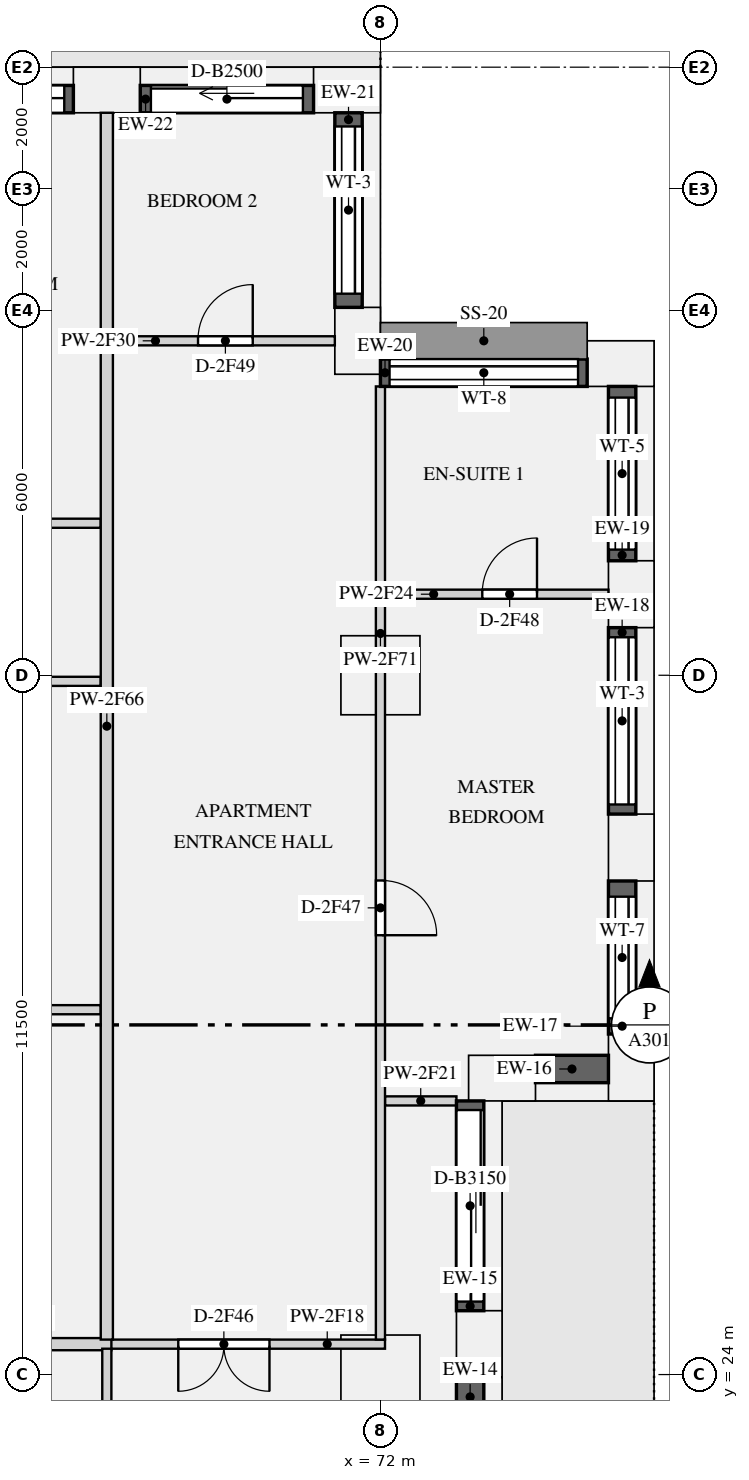
"""IFC4 building model, lengths in metres.
Left out: names, types, materials, properties, quantities, classifications, styles, units other than length and angle.
Written with IfcOpenShell. Run it as: python <this file> out.ifc"""

import sys

from ifc_helpers import new_model, si_unit, direction, frame, frame_2d, origin, origin_2d, place, context, subcontext, project, spatial, rectangle, extrude, element, fill, save


model = new_model("IFC4")
c1 = context("Model", 3, precision=1e-05, world=origin(), true_north=direction((0.0, 1.0)))
c2 = subcontext(c1, "Body", "Model", "MODEL_VIEW")
j1 = project(units=[si_unit("LENGTHUNIT", "METRE"), si_unit("PLANEANGLEUNIT", "RADIAN")], contexts=[c1])
p1 = place(None, origin())
s1 = spatial("IfcSite", under=j1, at=p1, CompositionType="ELEMENT")
p2 = place(p1, origin())
s2 = spatial("IfcBuilding", under=s1, at=p2, CompositionType="ELEMENT")
p3 = place(p2, frame((0.0, 0.0, 127.65)))
s3 = spatial("IfcBuildingStorey", under=s2, at=p3, CompositionType="ELEMENT", Elevation=127.65)
for number, where, z_axis, x_axis in (
    (1, (73.625, 24.5, 0.0), (0.0, 0.0, 1.0), (0.0, 1.0, 0.0)),
    (2, (74.0, 28.875, 0.0), (0.0, 0.0, 1.0), (1.0, 0.0, 0.0)),
    (3, (76.125, 29.05, 0.0), (0.0, 0.0, 1.0), (0.0, 1.0, 0.0)),
    (4, (76.125, 32.667, 0.0), (0.0, 0.0, 1.0), (0.0, 1.0, 0.0)),
    (5, (76.125, 36.833, 0.0), (0.0, 0.0, 1.0), (0.0, 1.0, 0.0)),
    (6, (75.95, 40.625, 0.0), (0.0, 0.0, 1.0), (-1.0, 0.0, 0.0)),
    (7, (71.625, 41.0, 0.0), (0.0, 0.0, 1.0), (0.0, 1.0, 0.0)),
    (8, (71.45, 45.125, 0.0), (0.0, 0.0, 1.0), (-1.0, 0.0, 0.0)),
    (9, (67.5, 45.125, 0.0), (0.0, 0.0, 1.0), (-1.0, 0.0, 0.0)),
):
    element("IfcColumn", number, at=place(p3, frame(where, z_axis=z_axis, x_axis=x_axis)), inside=s3, PredefinedType="USERDEFINED", context=c2, shape_type="SweptSolid", body=[
        extrude(rectangle(XDim=1.1, YDim=0.75, at=origin_2d()), origin(), (0.0, 0.0, 1.0), 3.15),
    ])
for number, where, z_axis, x_axis in (
    (10, (72.0, 24.0, 0.0), (0.0, 0.0, 1.0), (1.0, 0.0, 0.0)),
    (11, (72.0, 35.5, 0.0), (0.0, 0.0, 1.0), (1.0, 0.0, 0.0)),
):
    element("IfcColumn", number, at=place(p3, frame(where, z_axis=z_axis, x_axis=x_axis)), inside=s3, PredefinedType="COLUMN", context=c2, shape_type="SweptSolid", body=[
        extrude(rectangle(XDim=1.3, YDim=1.3, at=origin_2d()), origin(), (0.0, 0.0, 1.0), 3.15),
    ])
p4 = place(p3, frame((73.475, 21.05, 0.0), z_axis=(0.0, 0.0, 1.0), x_axis=(0.0, 1.0, 0.0)))
e12 = element("IfcWall", 12, at=p4, inside=s3, PredefinedType="SOLIDWALL", context=c2, shape_type="SweptSolid", body=[
    extrude(rectangle(XDim=2.9, YDim=0.45, at=frame_2d((1.45, 0.0))), origin(), (0.0, 0.0, 1.0), 2.65),
])
p5 = place(p4, frame((0.165, 0.0, 0.0)))
e13 = element("IfcOpeningElement", 13, at=p5, cuts=e12, PredefinedType="OPENING", context=c2, shape_type="SweptSolid", body=[
    extrude(rectangle(XDim=2.1, YDim=2.3, at=frame_2d((1.05, 1.15))), frame((0.0, 0.235, 0.0), z_axis=(0.0, -1.0, 0.0), x_axis=(1.0, 0.0, 0.0)), (0.0, 0.0, 1.0), 0.47),
])
p6 = place(p3, frame((73.475, 25.05, 0.0), z_axis=(0.0, 0.0, 1.0), x_axis=(0.0, 1.0, 0.0)))
e14 = element("IfcWall", 14, at=p6, inside=s3, PredefinedType="SOLIDWALL", context=c2, shape_type="SweptSolid", body=[
    extrude(rectangle(XDim=3.45, YDim=0.45, at=frame_2d((1.725, 0.0))), origin(), (0.0, 0.0, 1.0), 2.65),
])
p7 = place(p6, frame((0.15, 0.0, 0.0)))
e15 = element("IfcOpeningElement", 15, at=p7, cuts=e14, PredefinedType="OPENING", context=c2, shape_type="SweptSolid", body=[
    extrude(rectangle(XDim=3.15, YDim=2.3, at=frame_2d((1.575, 1.15))), frame((0.0, 0.235, 0.0), z_axis=(0.0, -1.0, 0.0), x_axis=(1.0, 0.0, 0.0)), (0.0, 0.0, 1.0), 0.47),
])
p8 = place(p3, frame((74.55, 29.025, 0.9), z_axis=(0.0, 0.0, 1.0), x_axis=(1.0, 0.0, 0.0)))
e16 = element("IfcWall", 16, at=p8, inside=s3, PredefinedType="SOLIDWALL", context=c2, shape_type="SweptSolid", body=[
    extrude(rectangle(XDim=1.2, YDim=0.45, at=frame_2d((0.6, 0.0))), origin(), (0.0, 0.0, 1.0), 1.75),
])
p9 = place(p3, frame((75.975, 29.6, 0.9), z_axis=(0.0, 0.0, 1.0), x_axis=(0.0, 1.0, 0.0)))
e17 = element("IfcWall", 17, at=p9, inside=s3, PredefinedType="SOLIDWALL", context=c2, shape_type="SweptSolid", body=[
    extrude(rectangle(XDim=2.517, YDim=0.45, at=frame_2d((1.258, 0.0))), origin(), (0.0, 0.0, 1.0), 1.75),
])
p10 = place(p9, frame((0.259, 0.0, 0.15)))
e18 = element("IfcOpeningElement", 18, at=p10, cuts=e17, PredefinedType="OPENING", context=c2, shape_type="SweptSolid", body=[
    extrude(rectangle(XDim=2.0, YDim=1.5, at=frame_2d((1.0, 0.75))), frame((0.0, 0.235, 0.0), z_axis=(0.0, -1.0, 0.0), x_axis=(1.0, 0.0, 0.0)), (0.0, 0.0, 1.0), 0.47),
])
p11 = place(p3, frame((75.975, 33.217, 0.9), z_axis=(0.0, 0.0, 1.0), x_axis=(0.0, 1.0, 0.0)))
e19 = element("IfcWall", 19, at=p11, inside=s3, PredefinedType="SOLIDWALL", context=c2, shape_type="SweptSolid", body=[
    extrude(rectangle(XDim=3.066, YDim=0.45, at=frame_2d((1.533, 0.0))), origin(), (0.0, 0.0, 1.0), 1.75),
])
p12 = place(p11, frame((0.158, 0.0, 0.15)))
e20 = element("IfcOpeningElement", 20, at=p12, cuts=e19, PredefinedType="OPENING", context=c2, shape_type="SweptSolid", body=[
    extrude(rectangle(XDim=2.75, YDim=1.5, at=frame_2d((1.375, 0.75))), frame((0.0, 0.235, 0.0), z_axis=(0.0, -1.0, 0.0), x_axis=(1.0, 0.0, 0.0)), (0.0, 0.0, 1.0), 0.47),
])
p13 = place(p3, frame((75.975, 37.383, 0.9), z_axis=(0.0, 0.0, 1.0), x_axis=(0.0, 1.0, 0.0)))
e21 = element("IfcWall", 21, at=p13, inside=s3, PredefinedType="SOLIDWALL", context=c2, shape_type="SweptSolid", body=[
    extrude(rectangle(XDim=2.867, YDim=0.45, at=frame_2d((1.434, 0.0))), origin(), (0.0, 0.0, 1.0), 1.75),
])
p14 = place(p13, frame((0.184, 0.0, 0.15)))
e22 = element("IfcOpeningElement", 22, at=p14, cuts=e21, PredefinedType="OPENING", context=c2, shape_type="SweptSolid", body=[
    extrude(rectangle(XDim=2.5, YDim=1.5, at=frame_2d((1.25, 0.75))), frame((0.0, 0.235, 0.0), z_axis=(0.0, -1.0, 0.0), x_axis=(1.0, 0.0, 0.0)), (0.0, 0.0, 1.0), 0.47),
])
p15 = place(p3, frame((75.4, 40.475, 0.9), z_axis=(0.0, 0.0, 1.0), x_axis=(-1.0, 0.0, 0.0)))
e23 = element("IfcWall", 23, at=p15, inside=s3, PredefinedType="SOLIDWALL", context=c2, shape_type="SweptSolid", body=[
    extrude(rectangle(XDim=3.4, YDim=0.45, at=frame_2d((1.7, 0.0))), origin(), (0.0, 0.0, 1.0), 1.75),
])
p16 = place(p15, frame((0.15, 0.0, 0.15)))
e24 = element("IfcOpeningElement", 24, at=p16, cuts=e23, PredefinedType="OPENING", context=c2, shape_type="SweptSolid", body=[
    extrude(rectangle(XDim=3.1, YDim=1.5, at=frame_2d((1.55, 0.75))), frame((0.0, 0.235, 0.0), z_axis=(0.0, -1.0, 0.0), x_axis=(1.0, 0.0, 0.0)), (0.0, 0.0, 1.0), 0.47),
])
p17 = place(p3, frame((71.475, 41.55, 0.9), z_axis=(0.0, 0.0, 1.0), x_axis=(0.0, 1.0, 0.0)))
e25 = element("IfcWall", 25, at=p17, inside=s3, PredefinedType="SOLIDWALL", context=c2, shape_type="SweptSolid", body=[
    extrude(rectangle(XDim=3.2, YDim=0.45, at=frame_2d((1.6, 0.0))), origin(), (0.0, 0.0, 1.0), 1.75),
])
p18 = place(p17, frame((0.225, 0.0, 0.15)))
e26 = element("IfcOpeningElement", 26, at=p18, cuts=e25, PredefinedType="OPENING", context=c2, shape_type="SweptSolid", body=[
    extrude(rectangle(XDim=2.75, YDim=1.5, at=frame_2d((1.375, 0.75))), frame((0.0, 0.235, 0.0), z_axis=(0.0, -1.0, 0.0), x_axis=(1.0, 0.0, 0.0)), (0.0, 0.0, 1.0), 0.47),
])
p19 = place(p3, frame((70.9, 44.975, 0.0), z_axis=(0.0, 0.0, 1.0), x_axis=(-1.0, 0.0, 0.0)))
e27 = element("IfcWall", 27, at=p19, inside=s3, PredefinedType="SOLIDWALL", context=c2, shape_type="SweptSolid", body=[
    extrude(rectangle(XDim=2.85, YDim=0.45, at=frame_2d((1.425, 0.0))), origin(), (0.0, 0.0, 1.0), 2.65),
])
p20 = place(p19, frame((0.175, 0.0, 0.0)))
e28 = element("IfcOpeningElement", 28, at=p20, cuts=e27, PredefinedType="OPENING", context=c2, shape_type="SweptSolid", body=[
    extrude(rectangle(XDim=2.5, YDim=2.3, at=frame_2d((1.25, 1.15))), frame((0.0, 0.235, 0.0), z_axis=(0.0, -1.0, 0.0), x_axis=(1.0, 0.0, 0.0)), (0.0, 0.0, 1.0), 0.47),
])
p21 = place(p3, frame((66.95, 44.975, 0.0), z_axis=(0.0, 0.0, 1.0), x_axis=(-1.0, 0.0, 0.0)))
e29 = element("IfcWall", 29, at=p21, inside=s3, PredefinedType="SOLIDWALL", context=c2, shape_type="SweptSolid", body=[
    extrude(rectangle(XDim=3.4, YDim=0.45, at=frame_2d((1.7, 0.0))), origin(), (0.0, 0.0, 1.0), 2.65),
])
p22 = place(p21, frame((0.15, 0.0, 0.0)))
e30 = element("IfcOpeningElement", 30, at=p22, cuts=e29, PredefinedType="OPENING", context=c2, shape_type="SweptSolid", body=[
    extrude(rectangle(XDim=3.1, YDim=2.3, at=frame_2d((1.55, 1.15))), frame((0.0, 0.235, 0.0), z_axis=(0.0, -1.0, 0.0), x_axis=(1.0, 0.0, 0.0)), (0.0, 0.0, 1.0), 0.47),
])
p23 = place(p3, frame((67.425, 24.5, 0.0), z_axis=(0.0, 0.0, 1.0), x_axis=(1.0, 0.0, 0.0)))
e31 = element("IfcWall", 31, at=p23, inside=s3, PredefinedType="PARTITIONING", context=c2, shape_type="SweptSolid", body=[
    extrude(rectangle(XDim=4.65, YDim=0.15, at=frame_2d((2.325, 0.0))), origin(), (0.0, 0.0, 1.0), 2.65),
])
p24 = place(p23, frame((1.25, 0.0, 0.0)))
e32 = element("IfcOpeningElement", 32, at=p24, cuts=e31, PredefinedType="OPENING", context=c2, shape_type="SweptSolid", body=[
    extrude(rectangle(XDim=1.5, YDim=2.1, at=frame_2d((0.75, 1.05))), frame((0.0, 0.085, 0.0), z_axis=(0.0, -1.0, 0.0), x_axis=(1.0, 0.0, 0.0)), (0.0, 0.0, 1.0), 0.17),
])
p25 = place(p3, frame((64.4, 24.5, 0.0), z_axis=(0.0, 0.0, 1.0), x_axis=(1.0, 0.0, 0.0)))
e33 = element("IfcWall", 33, at=p25, inside=s3, PredefinedType="PARTITIONING", context=c2, shape_type="SweptSolid", body=[
    extrude(rectangle(XDim=3.175, YDim=0.2, at=frame_2d((1.587, 0.0))), origin(), (0.0, 0.0, 1.0), 2.65),
])
p26 = place(p3, frame((72.075, 28.5, 0.0), z_axis=(0.0, 0.0, 1.0), x_axis=(1.0, 0.0, 0.0)))
e34 = element("IfcWall", 34, at=p26, inside=s3, PredefinedType="PARTITIONING", context=c2, shape_type="SweptSolid", body=[
    extrude(rectangle(XDim=1.175, YDim=0.15, at=frame_2d((0.587, 0.0))), origin(), (0.0, 0.0, 1.0), 2.65),
])
p27 = place(p3, frame((72.075, 36.833, 0.0), z_axis=(0.0, 0.0, 1.0), x_axis=(1.0, 0.0, 0.0)))
e35 = element("IfcWall", 35, at=p27, inside=s3, PredefinedType="PARTITIONING", context=c2, shape_type="SweptSolid", body=[
    extrude(rectangle(XDim=3.675, YDim=0.15, at=frame_2d((1.837, 0.0))), origin(), (0.0, 0.0, 1.0), 2.65),
])
p28 = place(p27, frame((1.6, 0.0, 0.0)))
e36 = element("IfcOpeningElement", 36, at=p28, cuts=e35, PredefinedType="OPENING", context=c2, shape_type="SweptSolid", body=[
    extrude(rectangle(XDim=0.9, YDim=2.1, at=frame_2d((0.45, 1.05))), frame((0.0, 0.085, 0.0), z_axis=(0.0, -1.0, 0.0), x_axis=(1.0, 0.0, 0.0)), (0.0, 0.0, 1.0), 0.17),
])
p29 = place(p3, frame((59.8, 35.4, 0.0), z_axis=(0.0, 0.0, 1.0), x_axis=(1.0, 0.0, 0.0)))
e37 = element("IfcWall", 37, at=p29, inside=s3, PredefinedType="PARTITIONING", context=c2, shape_type="SweptSolid", body=[
    extrude(rectangle(XDim=7.6, YDim=0.15, at=frame_2d((3.8, 0.0))), origin(), (0.0, 0.0, 1.0), 2.65),
])
p30 = place(p29, frame((5.325, 0.0, 0.0)))
e38 = element("IfcOpeningElement", 38, at=p30, cuts=e37, PredefinedType="OPENING", context=c2, shape_type="SweptSolid", body=[
    extrude(rectangle(XDim=0.9, YDim=2.1, at=frame_2d((0.45, 1.05))), frame((0.0, 0.085, 0.0), z_axis=(0.0, -1.0, 0.0), x_axis=(1.0, 0.0, 0.0)), (0.0, 0.0, 1.0), 0.17),
])
p31 = place(p3, frame((67.6, 41.0, 0.0), z_axis=(0.0, 0.0, 1.0), x_axis=(1.0, 0.0, 0.0)))
e39 = element("IfcWall", 39, at=p31, inside=s3, PredefinedType="PARTITIONING", context=c2, shape_type="SweptSolid", body=[
    extrude(rectangle(XDim=3.65, YDim=0.15, at=frame_2d((1.825, 0.0))), origin(), (0.0, 0.0, 1.0), 2.65),
])
p32 = place(p31, frame((1.4, 0.0, 0.0)))
e40 = element("IfcOpeningElement", 40, at=p32, cuts=e39, PredefinedType="OPENING", context=c2, shape_type="SweptSolid", body=[
    extrude(rectangle(XDim=0.9, YDim=2.1, at=frame_2d((0.45, 1.05))), frame((0.0, 0.085, 0.0), z_axis=(0.0, -1.0, 0.0), x_axis=(1.0, 0.0, 0.0)), (0.0, 0.0, 1.0), 0.17),
])
p33 = place(p3, frame((62.925, 38.0, 0.0), z_axis=(0.0, 0.0, 1.0), x_axis=(1.0, 0.0, 0.0)))
e41 = element("IfcWall", 41, at=p33, inside=s3, PredefinedType="PARTITIONING", context=c2, shape_type="SweptSolid", body=[
    extrude(rectangle(XDim=4.475, YDim=0.15, at=frame_2d((2.237, 0.0))), origin(), (0.0, 0.0, 1.0), 2.65),
])
p34 = place(p33, frame((1.875, 0.0, 0.0)))
e42 = element("IfcOpeningElement", 42, at=p34, cuts=e41, PredefinedType="OPENING", context=c2, shape_type="SweptSolid", body=[
    extrude(rectangle(XDim=0.9, YDim=2.1, at=frame_2d((0.45, 1.05))), frame((0.0, 0.085, 0.0), z_axis=(0.0, -1.0, 0.0), x_axis=(1.0, 0.0, 0.0)), (0.0, 0.0, 1.0), 0.17),
])
p35 = place(p3, frame((59.8, 30.0, 0.0), z_axis=(0.0, 0.0, 1.0), x_axis=(1.0, 0.0, 0.0)))
e43 = element("IfcWall", 43, at=p35, inside=s3, PredefinedType="PARTITIONING", context=c2, shape_type="SweptSolid", body=[
    extrude(rectangle(XDim=7.6, YDim=0.15, at=frame_2d((3.8, 0.0))), origin(), (0.0, 0.0, 1.0), 2.65),
])
p36 = place(p35, frame((1.9, 0.0, 0.0)))
e44 = element("IfcOpeningElement", 44, at=p36, cuts=e43, PredefinedType="OPENING", context=c2, shape_type="SweptSolid", body=[
    extrude(rectangle(XDim=0.9, YDim=2.1, at=frame_2d((0.45, 1.05))), frame((0.0, 0.085, 0.0), z_axis=(0.0, -1.0, 0.0), x_axis=(1.0, 0.0, 0.0)), (0.0, 0.0, 1.0), 0.17),
])
p37 = place(p3, frame((67.5, 16.575, 0.0), z_axis=(0.0, 0.0, 1.0), x_axis=(0.0, 1.0, 0.0)))
e45 = element("IfcWall", 45, at=p37, inside=s3, PredefinedType="PARTITIONING", context=c2, shape_type="SweptSolid", body=[
    extrude(rectangle(XDim=7.85, YDim=0.15, at=frame_2d((3.925, 0.0))), origin(), (0.0, 0.0, 1.0), 2.65),
])
p38 = place(p3, frame((67.5, 24.575, 0.0), z_axis=(0.0, 0.0, 1.0), x_axis=(0.0, 1.0, 0.0)))
e46 = element("IfcWall", 46, at=p38, inside=s3, PredefinedType="PARTITIONING", context=c2, shape_type="SweptSolid", body=[
    extrude(rectangle(XDim=20.175, YDim=0.2, at=frame_2d((10.087, 0.0))), origin(), (0.0, 0.0, 1.0), 2.65),
])
p39 = place(p3, frame((72.0, 24.575, 0.0), z_axis=(0.0, 0.0, 1.0), x_axis=(0.0, 1.0, 0.0)))
e47 = element("IfcWall", 47, at=p39, inside=s3, PredefinedType="PARTITIONING", context=c2, shape_type="SweptSolid", body=[
    extrude(rectangle(XDim=15.675, YDim=0.15, at=frame_2d((7.837, 0.0))), origin(), (0.0, 0.0, 1.0), 2.65),
])
p40 = place(p39, frame((6.65, 0.0, 0.0)))
e48 = element("IfcOpeningElement", 48, at=p40, cuts=e47, PredefinedType="OPENING", context=c2, shape_type="SweptSolid", body=[
    extrude(rectangle(XDim=0.9, YDim=2.1, at=frame_2d((0.45, 1.05))), frame((0.0, 0.085, 0.0), z_axis=(0.0, -1.0, 0.0), x_axis=(1.0, 0.0, 0.0)), (0.0, 0.0, 1.0), 0.17),
])
p41 = place(p7, origin())
e49 = element("IfcDoor", 49, at=p41, inside=s3, OperationType="SLIDING_TO_LEFT", PredefinedType="DOOR", context=c2, shape_type="SweptSolid", body=[
    extrude(rectangle(XDim=3.15, YDim=2.3, at=frame_2d((1.575, 1.15))), frame((0.0, -0.07, 0.0), z_axis=(0.0, -1.0, 0.0), x_axis=(1.0, 0.0, 0.0)), (0.0, 0.0, 1.0), 0.05),
])
fill(e15, e49)
p42 = place(p10, origin())
e50 = element("IfcWindow", 50, at=p42, inside=s3, PartitioningType="SINGLE_PANEL", PredefinedType="WINDOW", context=c2, shape_type="SweptSolid", body=[
    extrude(rectangle(XDim=2.0, YDim=1.5, at=frame_2d((1.0, 0.75))), frame((0.0, -0.065, 0.0), z_axis=(0.0, -1.0, 0.0), x_axis=(1.0, 0.0, 0.0)), (0.0, 0.0, 1.0), 0.06),
])
fill(e18, e50)
p43 = place(p12, origin())
e51 = element("IfcWindow", 51, at=p43, inside=s3, PartitioningType="SINGLE_PANEL", PredefinedType="WINDOW", context=c2, shape_type="SweptSolid", body=[
    extrude(rectangle(XDim=2.75, YDim=1.5, at=frame_2d((1.375, 0.75))), frame((0.0, -0.065, 0.0), z_axis=(0.0, -1.0, 0.0), x_axis=(1.0, 0.0, 0.0)), (0.0, 0.0, 1.0), 0.06),
])
fill(e20, e51)
p44 = place(p14, origin())
e52 = element("IfcWindow", 52, at=p44, inside=s3, PartitioningType="SINGLE_PANEL", PredefinedType="WINDOW", context=c2, shape_type="SweptSolid", body=[
    extrude(rectangle(XDim=2.5, YDim=1.5, at=frame_2d((1.25, 0.75))), frame((0.0, -0.065, 0.0), z_axis=(0.0, -1.0, 0.0), x_axis=(1.0, 0.0, 0.0)), (0.0, 0.0, 1.0), 0.06),
])
fill(e22, e52)
p45 = place(p16, origin())
e53 = element("IfcWindow", 53, at=p45, inside=s3, PartitioningType="SINGLE_PANEL", PredefinedType="WINDOW", context=c2, shape_type="SweptSolid", body=[
    extrude(rectangle(XDim=3.1, YDim=1.5, at=frame_2d((1.55, 0.75))), frame((0.0, -0.065, 0.0), z_axis=(0.0, -1.0, 0.0), x_axis=(1.0, 0.0, 0.0)), (0.0, 0.0, 1.0), 0.06),
])
fill(e24, e53)
p46 = place(p18, origin())
e54 = element("IfcWindow", 54, at=p46, inside=s3, PartitioningType="SINGLE_PANEL", PredefinedType="WINDOW", context=c2, shape_type="SweptSolid", body=[
    extrude(rectangle(XDim=2.75, YDim=1.5, at=frame_2d((1.375, 0.75))), frame((0.0, -0.065, 0.0), z_axis=(0.0, -1.0, 0.0), x_axis=(1.0, 0.0, 0.0)), (0.0, 0.0, 1.0), 0.06),
])
fill(e26, e54)
p47 = place(p20, origin())
e55 = element("IfcDoor", 55, at=p47, inside=s3, OperationType="SLIDING_TO_LEFT", PredefinedType="DOOR", context=c2, shape_type="SweptSolid", body=[
    extrude(rectangle(XDim=2.5, YDim=2.3, at=frame_2d((1.25, 1.15))), frame((0.0, -0.07, 0.0), z_axis=(0.0, -1.0, 0.0), x_axis=(1.0, 0.0, 0.0)), (0.0, 0.0, 1.0), 0.05),
])
fill(e28, e55)
p48 = place(p22, origin())
e56 = element("IfcDoor", 56, at=p48, inside=s3, OperationType="SLIDING_TO_LEFT", PredefinedType="DOOR", context=c2, shape_type="SweptSolid", body=[
    extrude(rectangle(XDim=3.1, YDim=2.3, at=frame_2d((1.55, 1.15))), frame((0.0, -0.07, 0.0), z_axis=(0.0, -1.0, 0.0), x_axis=(1.0, 0.0, 0.0)), (0.0, 0.0, 1.0), 0.05),
])
fill(e30, e56)
p49 = place(p24, frame((1.5, 0.0, 0.0), z_axis=(0.0, 0.0, 1.0), x_axis=(-1.0, 0.0, 0.0)))
e57 = element("IfcDoor", 57, at=p49, inside=s3, OperationType="DOUBLE_DOOR_SINGLE_SWING", PredefinedType="DOOR", context=c2, shape_type="SweptSolid", body=[
    extrude(rectangle(XDim=1.5, YDim=2.1, at=frame_2d((0.75, 1.05))), frame((0.0, 0.025, 0.0), z_axis=(0.0, -1.0, 0.0), x_axis=(1.0, 0.0, 0.0)), (0.0, 0.0, 1.0), 0.05),
])
fill(e32, e57)
p50 = place(p40, frame((0.9, 0.0, 0.0), z_axis=(0.0, 0.0, 1.0), x_axis=(-1.0, 0.0, 0.0)))
e58 = element("IfcDoor", 58, at=p50, inside=s3, OperationType="SINGLE_SWING_RIGHT", PredefinedType="DOOR", context=c2, shape_type="SweptSolid", body=[
    extrude(rectangle(XDim=0.9, YDim=2.1, at=frame_2d((0.45, 1.05))), frame((0.0, 0.025, 0.0), z_axis=(0.0, -1.0, 0.0), x_axis=(1.0, 0.0, 0.0)), (0.0, 0.0, 1.0), 0.05),
])
fill(e48, e58)
p51 = place(p28, origin())
e59 = element("IfcDoor", 59, at=p51, inside=s3, OperationType="SINGLE_SWING_RIGHT", PredefinedType="DOOR", context=c2, shape_type="SweptSolid", body=[
    extrude(rectangle(XDim=0.9, YDim=2.1, at=frame_2d((0.45, 1.05))), frame((0.0, 0.025, 0.0), z_axis=(0.0, -1.0, 0.0), x_axis=(1.0, 0.0, 0.0)), (0.0, 0.0, 1.0), 0.05),
])
fill(e36, e59)
p52 = place(p32, origin())
e60 = element("IfcDoor", 60, at=p52, inside=s3, OperationType="SINGLE_SWING_RIGHT", PredefinedType="DOOR", context=c2, shape_type="SweptSolid", body=[
    extrude(rectangle(XDim=0.9, YDim=2.1, at=frame_2d((0.45, 1.05))), frame((0.0, 0.025, 0.0), z_axis=(0.0, -1.0, 0.0), x_axis=(1.0, 0.0, 0.0)), (0.0, 0.0, 1.0), 0.05),
])
fill(e40, e60)
save(model, sys.argv[1])
